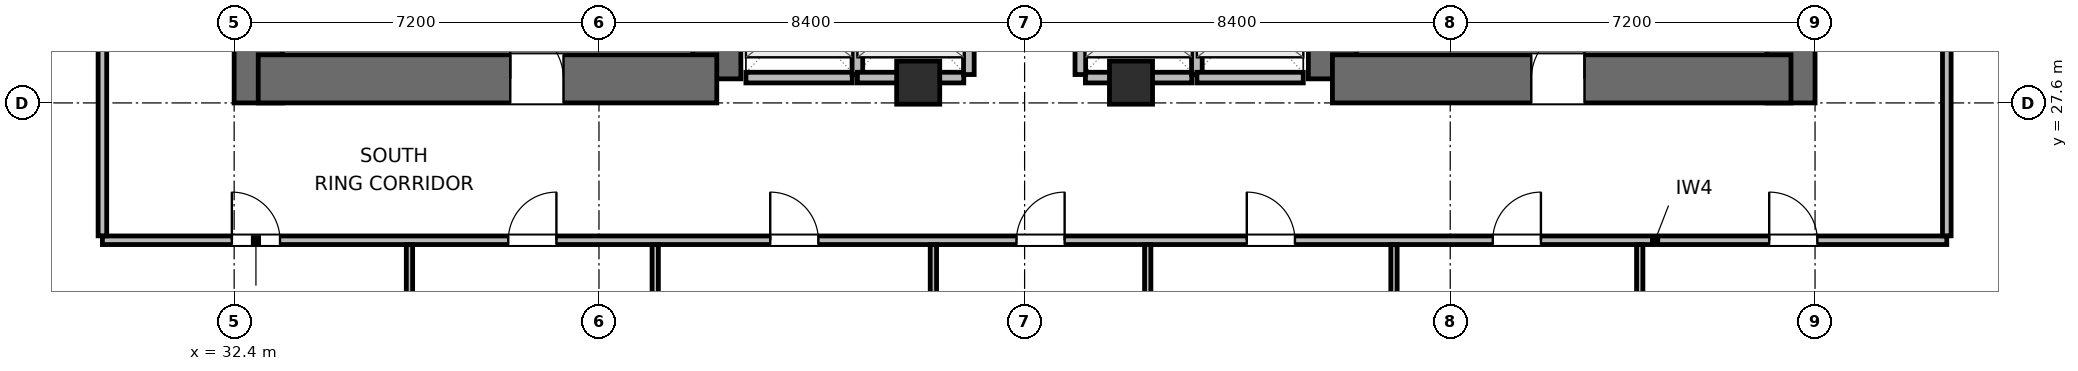
"""IFC4 building model, lengths in metres.
Left out: names, types, materials, properties, quantities, classifications, styles, units other than length and angle.
Written with IfcOpenShell. Run it as: python <this file> out.ifc"""

import sys

from ifc_helpers import new_model, si_unit, direction, frame, frame_2d, origin, origin_2d, place, context, subcontext, project, spatial, rectangle, extrude, element, fill, save


model = new_model("IFC4")
c1 = context("Model", 3, precision=1e-05, world=origin(), true_north=direction((0.0, 1.0)))
c2 = subcontext(c1, "Body", "Model", "MODEL_VIEW")
j1 = project(units=[si_unit("LENGTHUNIT", "METRE"), si_unit("PLANEANGLEUNIT", "RADIAN")], contexts=[c1])
p1 = place(None, origin())
s1 = spatial("IfcSite", under=j1, at=p1, CompositionType="ELEMENT")
p2 = place(p1, origin())
s2 = spatial("IfcBuilding", under=s1, at=p2, CompositionType="ELEMENT")
p3 = place(p2, frame((0.0, 0.0, 52.8)))
s3 = spatial("IfcBuildingStorey", under=s2, at=p3, CompositionType="ELEMENT", Elevation=52.8)
p4 = place(p3, frame((32.875, 27.6, 0.0), z_axis=(0.0, 0.0, 1.0), x_axis=(0.0, 1.0, 0.0)))
e1 = element("IfcWall", 1, at=p4, inside=s3, PredefinedType="SHEAR", context=c2, shape_type="SweptSolid", body=[
    extrude(rectangle(XDim=16.8, YDim=0.95, at=frame_2d((8.4, 0.0))), origin(), (0.0, 0.0, 1.0), 3.9),
])
p5 = place(p3, frame((41.925, 28.075, 0.0), z_axis=(0.0, 0.0, 1.0), x_axis=(0.0, 1.0, 0.0)))
e2 = element("IfcWall", 2, at=p5, inside=s3, PredefinedType="SHEAR", context=c2, shape_type="SweptSolid", body=[
    extrude(rectangle(XDim=6.325, YDim=0.95, at=frame_2d((3.163, 0.0))), origin(), (0.0, 0.0, 1.0), 3.9),
])
p6 = place(p3, frame((32.875, 28.075, 0.0), z_axis=(0.0, 0.0, 1.0), x_axis=(1.0, 0.0, 0.0)))
e3 = element("IfcWall", 3, at=p6, inside=s3, PredefinedType="SHEAR", context=c2, shape_type="SweptSolid", body=[
    extrude(rectangle(XDim=9.05, YDim=0.95, at=frame_2d((4.525, 0.0))), origin(), (0.0, 0.0, 1.0), 3.9),
])
p7 = place(p6, frame((4.975, 0.0, 0.0)))
e4 = element("IfcOpeningElement", 4, at=p7, cuts=e3, PredefinedType="OPENING", context=c2, shape_type="SweptSolid", body=[
    extrude(rectangle(XDim=1.05, YDim=2.04, at=frame_2d((0.525, 1.02))), frame((0.0, 0.485, 0.0), z_axis=(0.0, -1.0, 0.0), x_axis=(1.0, 0.0, 0.0)), (0.0, 0.0, 1.0), 0.97),
])
p8 = place(p3, frame((54.075, 28.075, 0.0), z_axis=(0.0, 0.0, 1.0), x_axis=(0.0, 1.0, 0.0)))
e5 = element("IfcWall", 5, at=p8, inside=s3, PredefinedType="SHEAR", context=c2, shape_type="SweptSolid", body=[
    extrude(rectangle(XDim=7.725, YDim=0.95, at=frame_2d((3.863, 0.0))), origin(), (0.0, 0.0, 1.0), 3.9),
])
p9 = place(p3, frame((63.125, 27.6, 0.0), z_axis=(0.0, 0.0, 1.0), x_axis=(0.0, 1.0, 0.0)))
e6 = element("IfcWall", 6, at=p9, inside=s3, PredefinedType="SHEAR", context=c2, shape_type="SweptSolid", body=[
    extrude(rectangle(XDim=16.8, YDim=0.95, at=frame_2d((8.4, 0.0))), origin(), (0.0, 0.0, 1.0), 3.9),
])
p10 = place(p3, frame((54.075, 28.075, 0.0), z_axis=(0.0, 0.0, 1.0), x_axis=(1.0, 0.0, 0.0)))
e7 = element("IfcWall", 7, at=p10, inside=s3, PredefinedType="SHEAR", context=c2, shape_type="SweptSolid", body=[
    extrude(rectangle(XDim=9.05, YDim=0.95, at=frame_2d((4.525, 0.0))), origin(), (0.0, 0.0, 1.0), 3.9),
])
p11 = place(p10, frame((3.925, 0.0, 0.0)))
e8 = element("IfcOpeningElement", 8, at=p11, cuts=e7, PredefinedType="OPENING", context=c2, shape_type="SweptSolid", body=[
    extrude(rectangle(XDim=1.05, YDim=2.04, at=frame_2d((0.525, 1.02))), frame((0.0, 0.485, 0.0), z_axis=(0.0, -1.0, 0.0), x_axis=(1.0, 0.0, 0.0)), (0.0, 0.0, 1.0), 0.97),
])
for number, where, z_axis, x_axis in (
    (9, (45.9, 28.0, 0.0), (0.0, 0.0, 1.0), (1.0, 0.0, 0.0)),
    (10, (50.1, 28.0, 0.0), (0.0, 0.0, 1.0), (1.0, 0.0, 0.0)),
):
    element("IfcColumn", number, at=place(p3, frame(where, z_axis=z_axis, x_axis=x_axis)), inside=s3, PredefinedType="COLUMN", context=c2, shape_type="SweptSolid", body=[
        extrude(rectangle(XDim=0.85, YDim=0.85, at=origin_2d()), origin(), (0.0, 0.0, 1.0), 3.9),
    ])
p12 = place(p3, frame((42.5, 28.1, 0.0), z_axis=(0.0, 0.0, 1.0), x_axis=(1.0, 0.0, 0.0)))
e11 = element("IfcWall", 11, at=p12, inside=s3, PredefinedType="PARTITIONING", context=c2, shape_type="SweptSolid", body=[
    extrude(rectangle(XDim=2.1, YDim=0.21, at=frame_2d((1.05, 0.0))), origin(), (0.0, 0.0, 1.0), 2.525),
])
p13 = place(p3, frame((44.7, 28.16, 0.0), z_axis=(0.0, 0.0, 1.0), x_axis=(0.0, 1.0, 0.0)))
e12 = element("IfcWall", 12, at=p13, inside=s3, PredefinedType="PARTITIONING", context=c2, shape_type="SweptSolid", body=[
    extrude(rectangle(XDim=2.28, YDim=0.21, at=frame_2d((1.14, 0.0))), origin(), (0.0, 0.0, 1.0), 3.64),
])
p14 = place(p3, frame((44.7, 28.1, 0.0), z_axis=(0.0, 0.0, 1.0), x_axis=(1.0, 0.0, 0.0)))
e13 = element("IfcWall", 13, at=p14, inside=s3, PredefinedType="PARTITIONING", context=c2, shape_type="SweptSolid", body=[
    extrude(rectangle(XDim=2.1, YDim=0.21, at=frame_2d((1.05, 0.0))), origin(), (0.0, 0.0, 1.0), 2.525),
])
p15 = place(p3, frame((46.9, 28.16, 0.0), z_axis=(0.0, 0.0, 1.0), x_axis=(0.0, 1.0, 0.0)))
e14 = element("IfcWall", 14, at=p15, inside=s3, PredefinedType="PARTITIONING", context=c2, shape_type="SweptSolid", body=[
    extrude(rectangle(XDim=2.28, YDim=0.21, at=frame_2d((1.14, 0.0))), origin(), (0.0, 0.0, 1.0), 3.64),
])
p16 = place(p3, frame((49.2, 28.1, 0.0), z_axis=(0.0, 0.0, 1.0), x_axis=(1.0, 0.0, 0.0)))
e15 = element("IfcWall", 15, at=p16, inside=s3, PredefinedType="PARTITIONING", context=c2, shape_type="SweptSolid", body=[
    extrude(rectangle(XDim=2.1, YDim=0.21, at=frame_2d((1.05, 0.0))), origin(), (0.0, 0.0, 1.0), 2.525),
])
for number, where, z_axis, x_axis in (
    (16, (49.1, 28.16, 0.0), (0.0, 0.0, 1.0), (0.0, 1.0, 0.0)),
    (17, (51.4, 28.16, 0.0), (0.0, 0.0, 1.0), (0.0, 1.0, 0.0)),
):
    element("IfcWall", number, at=place(p3, frame(where, z_axis=z_axis, x_axis=x_axis)), inside=s3, PredefinedType="PARTITIONING", context=c2, shape_type="SweptSolid", body=[
        extrude(rectangle(XDim=2.28, YDim=0.21, at=frame_2d((1.14, 0.0))), origin(), (0.0, 0.0, 1.0), 3.64),
    ])
p17 = place(p3, frame((51.4, 28.1, 0.0), z_axis=(0.0, 0.0, 1.0), x_axis=(1.0, 0.0, 0.0)))
e18 = element("IfcWall", 18, at=p17, inside=s3, PredefinedType="PARTITIONING", context=c2, shape_type="SweptSolid", body=[
    extrude(rectangle(XDim=2.1, YDim=0.21, at=frame_2d((1.05, 0.0))), origin(), (0.0, 0.0, 1.0), 2.525),
])
p18 = place(p3, frame((29.8, 24.89, 0.0), z_axis=(0.0, 0.0, 1.0), x_axis=(1.0, 0.0, 0.0)))
e19 = element("IfcWall", 19, at=p18, inside=s3, PredefinedType="PARTITIONING", context=c2, shape_type="SweptSolid", body=[
    extrude(rectangle(XDim=36.4, YDim=0.17, at=frame_2d((18.2, 0.0))), origin(), (0.0, 0.0, 1.0), 3.64),
])
p19 = place(p18, frame((2.555, 0.0, 0.0)))
e20 = element("IfcOpeningElement", 20, at=p19, cuts=e19, PredefinedType="OPENING", context=c2, shape_type="SweptSolid", body=[
    extrude(rectangle(XDim=0.95, YDim=2.04, at=frame_2d((0.475, 1.02))), frame((0.0, 0.095, 0.0), z_axis=(0.0, -1.0, 0.0), x_axis=(1.0, 0.0, 0.0)), (0.0, 0.0, 1.0), 0.19),
])
p20 = place(p18, frame((8.01, 0.0, 0.0)))
e21 = element("IfcOpeningElement", 21, at=p20, cuts=e19, PredefinedType="OPENING", context=c2, shape_type="SweptSolid", body=[
    extrude(rectangle(XDim=0.95, YDim=2.04, at=frame_2d((0.475, 1.02))), frame((0.0, 0.095, 0.0), z_axis=(0.0, -1.0, 0.0), x_axis=(1.0, 0.0, 0.0)), (0.0, 0.0, 1.0), 0.19),
])
p21 = place(p18, frame((13.18, 0.0, 0.0)))
e22 = element("IfcOpeningElement", 22, at=p21, cuts=e19, PredefinedType="OPENING", context=c2, shape_type="SweptSolid", body=[
    extrude(rectangle(XDim=0.95, YDim=2.04, at=frame_2d((0.475, 1.02))), frame((0.0, 0.095, 0.0), z_axis=(0.0, -1.0, 0.0), x_axis=(1.0, 0.0, 0.0)), (0.0, 0.0, 1.0), 0.19),
])
p22 = place(p18, frame((18.04, 0.0, 0.0)))
e23 = element("IfcOpeningElement", 23, at=p22, cuts=e19, PredefinedType="OPENING", context=c2, shape_type="SweptSolid", body=[
    extrude(rectangle(XDim=0.95, YDim=2.04, at=frame_2d((0.475, 1.02))), frame((0.0, 0.095, 0.0), z_axis=(0.0, -1.0, 0.0), x_axis=(1.0, 0.0, 0.0)), (0.0, 0.0, 1.0), 0.19),
])
p23 = place(p18, frame((22.585, 0.0, 0.0)))
e24 = element("IfcOpeningElement", 24, at=p23, cuts=e19, PredefinedType="OPENING", context=c2, shape_type="SweptSolid", body=[
    extrude(rectangle(XDim=0.95, YDim=2.04, at=frame_2d((0.475, 1.02))), frame((0.0, 0.095, 0.0), z_axis=(0.0, -1.0, 0.0), x_axis=(1.0, 0.0, 0.0)), (0.0, 0.0, 1.0), 0.19),
])
p24 = place(p18, frame((27.44, 0.0, 0.0)))
e25 = element("IfcOpeningElement", 25, at=p24, cuts=e19, PredefinedType="OPENING", context=c2, shape_type="SweptSolid", body=[
    extrude(rectangle(XDim=0.95, YDim=2.04, at=frame_2d((0.475, 1.02))), frame((0.0, 0.095, 0.0), z_axis=(0.0, -1.0, 0.0), x_axis=(1.0, 0.0, 0.0)), (0.0, 0.0, 1.0), 0.19),
])
p25 = place(p18, frame((32.895, 0.0, 0.0)))
e26 = element("IfcOpeningElement", 26, at=p25, cuts=e19, PredefinedType="OPENING", context=c2, shape_type="SweptSolid", body=[
    extrude(rectangle(XDim=0.95, YDim=2.04, at=frame_2d((0.475, 1.02))), frame((0.0, 0.095, 0.0), z_axis=(0.0, -1.0, 0.0), x_axis=(1.0, 0.0, 0.0)), (0.0, 0.0, 1.0), 0.19),
])
p26 = place(p3, frame((29.8, 24.977, 0.0), z_axis=(0.0, 0.0, 1.0), x_axis=(0.0, 1.0, 0.0)))
e27 = element("IfcWall", 27, at=p26, inside=s3, PredefinedType="PARTITIONING", context=c2, shape_type="SweptSolid", body=[
    extrude(rectangle(XDim=22.046, YDim=0.17, at=frame_2d((11.023, 0.0))), origin(), (0.0, 0.0, 1.0), 3.64),
])
p27 = place(p26, frame((10.548, 0.0, 0.0)))
e28 = element("IfcOpeningElement", 28, at=p27, cuts=e27, PredefinedType="OPENING", context=c2, shape_type="SweptSolid", body=[
    extrude(rectangle(XDim=0.95, YDim=2.04, at=frame_2d((0.475, 1.02))), frame((0.0, 0.095, 0.0), z_axis=(0.0, -1.0, 0.0), x_axis=(1.0, 0.0, 0.0)), (0.0, 0.0, 1.0), 0.19),
])
p28 = place(p3, frame((66.2, 24.977, 0.0), z_axis=(0.0, 0.0, 1.0), x_axis=(0.0, 1.0, 0.0)))
e29 = element("IfcWall", 29, at=p28, inside=s3, PredefinedType="PARTITIONING", context=c2, shape_type="SweptSolid", body=[
    extrude(rectangle(XDim=22.046, YDim=0.17, at=frame_2d((11.023, 0.0))), origin(), (0.0, 0.0, 1.0), 3.64),
])
p29 = place(p28, frame((4.493, 0.0, 0.0)))
e30 = element("IfcOpeningElement", 30, at=p29, cuts=e29, PredefinedType="OPENING", context=c2, shape_type="SweptSolid", body=[
    extrude(rectangle(XDim=0.95, YDim=2.04, at=frame_2d((0.475, 1.02))), frame((0.0, 0.095, 0.0), z_axis=(0.0, -1.0, 0.0), x_axis=(1.0, 0.0, 0.0)), (0.0, 0.0, 1.0), 0.19),
])
p30 = place(p28, frame((15.603, 0.0, 0.0)))
e31 = element("IfcOpeningElement", 31, at=p30, cuts=e29, PredefinedType="OPENING", context=c2, shape_type="SweptSolid", body=[
    extrude(rectangle(XDim=0.95, YDim=2.04, at=frame_2d((0.475, 1.02))), frame((0.0, 0.095, 0.0), z_axis=(0.0, -1.0, 0.0), x_axis=(1.0, 0.0, 0.0)), (0.0, 0.0, 1.0), 0.19),
])
p31 = place(p3, frame((35.86, 9.915, 0.0), z_axis=(0.0, 0.0, 1.0), x_axis=(0.0, 1.0, 0.0)))
e32 = element("IfcWall", 32, at=p31, inside=s3, PredefinedType="PARTITIONING", context=c2, shape_type="SweptSolid", body=[
    extrude(rectangle(XDim=14.888, YDim=0.125, at=frame_2d((7.444, 0.0))), origin(), (0.0, 0.0, 1.0), 3.64),
])
p32 = place(p3, frame((40.71, 9.915, 0.0), z_axis=(0.0, 0.0, 1.0), x_axis=(0.0, 1.0, 0.0)))
e33 = element("IfcWall", 33, at=p32, inside=s3, PredefinedType="PARTITIONING", context=c2, shape_type="SweptSolid", body=[
    extrude(rectangle(XDim=14.888, YDim=0.125, at=frame_2d((7.444, 0.0))), origin(), (0.0, 0.0, 1.0), 3.003),
])
p33 = place(p3, frame((46.2, 13.575, 0.0), z_axis=(0.0, 0.0, 1.0), x_axis=(0.0, 1.0, 0.0)))
e34 = element("IfcWall", 34, at=p33, inside=s3, PredefinedType="PARTITIONING", context=c2, shape_type="SweptSolid", body=[
    extrude(rectangle(XDim=11.228, YDim=0.125, at=frame_2d((5.614, 0.0))), origin(), (0.0, 0.0, 1.0), 3.64),
])
p34 = place(p3, frame((50.43, 11.515, 0.0), z_axis=(0.0, 0.0, 1.0), x_axis=(0.0, 1.0, 0.0)))
e35 = element("IfcWall", 35, at=p34, inside=s3, PredefinedType="PARTITIONING", context=c2, shape_type="SweptSolid", body=[
    extrude(rectangle(XDim=13.288, YDim=0.125, at=frame_2d((6.644, 0.0))), origin(), (0.0, 0.0, 1.0), 3.64),
])
p35 = place(p3, frame((55.29, 9.915, 0.0), z_axis=(0.0, 0.0, 1.0), x_axis=(0.0, 1.0, 0.0)))
e36 = element("IfcWall", 36, at=p35, inside=s3, PredefinedType="PARTITIONING", context=c2, shape_type="SweptSolid", body=[
    extrude(rectangle(XDim=14.888, YDim=0.125, at=frame_2d((7.444, 0.0))), origin(), (0.0, 0.0, 1.0), 3.003),
])
p36 = place(p3, frame((60.14, 9.915, 0.0), z_axis=(0.0, 0.0, 1.0), x_axis=(0.0, 1.0, 0.0)))
e37 = element("IfcWall", 37, at=p36, inside=s3, PredefinedType="PARTITIONING", context=c2, shape_type="SweptSolid", body=[
    extrude(rectangle(XDim=14.888, YDim=0.125, at=frame_2d((7.444, 0.0))), origin(), (0.0, 0.0, 1.0), 3.64),
])
p37 = place(p7, origin())
e38 = element("IfcDoor", 38, at=p37, inside=s3, OperationType="SINGLE_SWING_LEFT", PredefinedType="DOOR", context=c2, shape_type="SweptSolid", body=[
    extrude(rectangle(XDim=1.05, YDim=2.04, at=frame_2d((0.525, 1.02))), frame((0.0, 0.025, 0.0), z_axis=(0.0, -1.0, 0.0), x_axis=(1.0, 0.0, 0.0)), (0.0, 0.0, 1.0), 0.05),
])
fill(e4, e38)
p38 = place(p11, origin())
e39 = element("IfcDoor", 39, at=p38, inside=s3, OperationType="SINGLE_SWING_RIGHT", PredefinedType="DOOR", context=c2, shape_type="SweptSolid", body=[
    extrude(rectangle(XDim=1.05, YDim=2.04, at=frame_2d((0.525, 1.02))), frame((0.0, 0.025, 0.0), z_axis=(0.0, -1.0, 0.0), x_axis=(1.0, 0.0, 0.0)), (0.0, 0.0, 1.0), 0.05),
])
fill(e8, e39)
p39 = place(p19, origin())
e40 = element("IfcDoor", 40, at=p39, inside=s3, OperationType="SINGLE_SWING_LEFT", PredefinedType="DOOR", context=c2, shape_type="SweptSolid", body=[
    extrude(rectangle(XDim=0.95, YDim=2.04, at=frame_2d((0.475, 1.02))), frame((0.0, 0.025, 0.0), z_axis=(0.0, -1.0, 0.0), x_axis=(1.0, 0.0, 0.0)), (0.0, 0.0, 1.0), 0.05),
])
fill(e20, e40)
p40 = place(p20, origin())
e41 = element("IfcDoor", 41, at=p40, inside=s3, OperationType="SINGLE_SWING_RIGHT", PredefinedType="DOOR", context=c2, shape_type="SweptSolid", body=[
    extrude(rectangle(XDim=0.95, YDim=2.04, at=frame_2d((0.475, 1.02))), frame((0.0, 0.025, 0.0), z_axis=(0.0, -1.0, 0.0), x_axis=(1.0, 0.0, 0.0)), (0.0, 0.0, 1.0), 0.05),
])
fill(e21, e41)
p41 = place(p21, origin())
e42 = element("IfcDoor", 42, at=p41, inside=s3, OperationType="SINGLE_SWING_LEFT", PredefinedType="DOOR", context=c2, shape_type="SweptSolid", body=[
    extrude(rectangle(XDim=0.95, YDim=2.04, at=frame_2d((0.475, 1.02))), frame((0.0, 0.025, 0.0), z_axis=(0.0, -1.0, 0.0), x_axis=(1.0, 0.0, 0.0)), (0.0, 0.0, 1.0), 0.05),
])
fill(e22, e42)
p42 = place(p22, origin())
e43 = element("IfcDoor", 43, at=p42, inside=s3, OperationType="SINGLE_SWING_RIGHT", PredefinedType="DOOR", context=c2, shape_type="SweptSolid", body=[
    extrude(rectangle(XDim=0.95, YDim=2.04, at=frame_2d((0.475, 1.02))), frame((0.0, 0.025, 0.0), z_axis=(0.0, -1.0, 0.0), x_axis=(1.0, 0.0, 0.0)), (0.0, 0.0, 1.0), 0.05),
])
fill(e23, e43)
p43 = place(p23, origin())
e44 = element("IfcDoor", 44, at=p43, inside=s3, OperationType="SINGLE_SWING_LEFT", PredefinedType="DOOR", context=c2, shape_type="SweptSolid", body=[
    extrude(rectangle(XDim=0.95, YDim=2.04, at=frame_2d((0.475, 1.02))), frame((0.0, 0.025, 0.0), z_axis=(0.0, -1.0, 0.0), x_axis=(1.0, 0.0, 0.0)), (0.0, 0.0, 1.0), 0.05),
])
fill(e24, e44)
p44 = place(p24, origin())
e45 = element("IfcDoor", 45, at=p44, inside=s3, OperationType="SINGLE_SWING_RIGHT", PredefinedType="DOOR", context=c2, shape_type="SweptSolid", body=[
    extrude(rectangle(XDim=0.95, YDim=2.04, at=frame_2d((0.475, 1.02))), frame((0.0, 0.025, 0.0), z_axis=(0.0, -1.0, 0.0), x_axis=(1.0, 0.0, 0.0)), (0.0, 0.0, 1.0), 0.05),
])
fill(e25, e45)
p45 = place(p25, origin())
e46 = element("IfcDoor", 46, at=p45, inside=s3, OperationType="SINGLE_SWING_LEFT", PredefinedType="DOOR", context=c2, shape_type="SweptSolid", body=[
    extrude(rectangle(XDim=0.95, YDim=2.04, at=frame_2d((0.475, 1.02))), frame((0.0, 0.025, 0.0), z_axis=(0.0, -1.0, 0.0), x_axis=(1.0, 0.0, 0.0)), (0.0, 0.0, 1.0), 0.05),
])
fill(e26, e46)
save(model, sys.argv[1])
